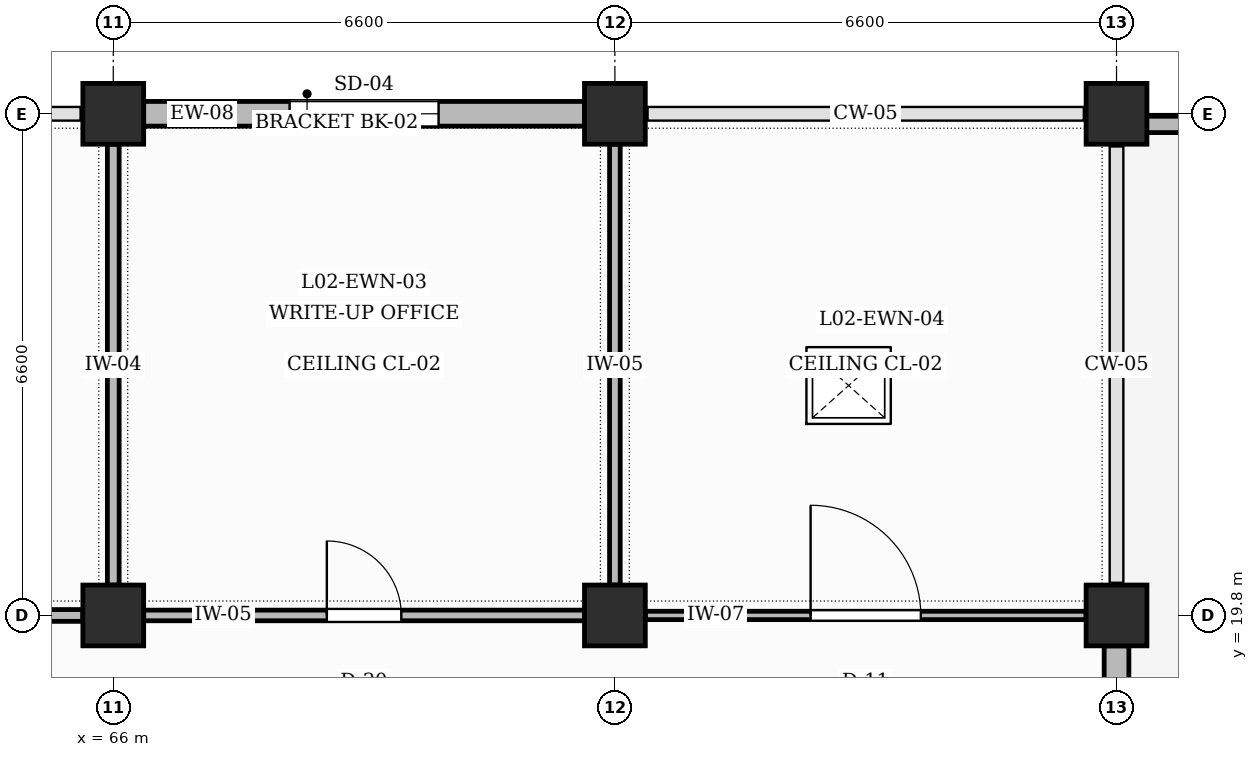
"""IFC4 building model, lengths in metres.
Left out: names, types, materials, properties, quantities, classifications, styles, units other than length and angle.
Written with IfcOpenShell. Run it as: python <this file> out.ifc"""

import sys

from ifc_helpers import new_model, si_unit, direction, frame, frame_2d, origin, origin_2d, place, context, subcontext, project, spatial, rectangle, extrude, element, fill, save


model = new_model("IFC4")
c1 = context("Model", 3, precision=1e-05, world=origin(), true_north=direction((0.0, 1.0)))
c2 = subcontext(c1, "Body", "Model", "MODEL_VIEW")
j1 = project(units=[si_unit("LENGTHUNIT", "METRE"), si_unit("PLANEANGLEUNIT", "RADIAN")], contexts=[c1])
p1 = place(None, origin())
s1 = spatial("IfcSite", under=j1, at=p1, CompositionType="ELEMENT")
p2 = place(p1, origin())
s2 = spatial("IfcBuilding", under=s1, at=p2, CompositionType="ELEMENT")
p3 = place(p2, frame((0.0, 0.0, 10.2)))
s3 = spatial("IfcBuildingStorey", under=s2, at=p3, CompositionType="ELEMENT", Elevation=10.2)
for number, where, z_axis, x_axis in (
    (1, (66.0, 19.8, 0.0), (0.0, 0.0, 1.0), (1.0, 0.0, 0.0)),
    (2, (66.0, 26.4, 0.0), (0.0, 0.0, 1.0), (1.0, 0.0, 0.0)),
    (3, (72.6, 19.8, 0.0), (0.0, 0.0, 1.0), (1.0, 0.0, 0.0)),
    (4, (72.6, 26.4, 0.0), (0.0, 0.0, 1.0), (1.0, 0.0, 0.0)),
    (5, (79.2, 19.8, 0.0), (0.0, 0.0, 1.0), (1.0, 0.0, 0.0)),
    (6, (79.2, 26.4, 0.0), (0.0, 0.0, 1.0), (1.0, 0.0, 0.0)),
):
    element("IfcColumn", number, at=place(p3, frame(where, z_axis=z_axis, x_axis=x_axis)), inside=s3, PredefinedType="COLUMN", context=c2, shape_type="SweptSolid", body=[
        extrude(rectangle(XDim=0.8, YDim=0.8, at=origin_2d()), origin(), (0.0, 0.0, 1.0), 4.2),
    ])
p4 = place(p3, frame((66.4, 26.4, 0.0), z_axis=(0.0, 0.0, 1.0), x_axis=(1.0, 0.0, 0.0)))
e7 = element("IfcWall", 7, at=p4, inside=s3, PredefinedType="SOLIDWALL", context=c2, shape_type="SweptSolid", body=[
    extrude(rectangle(XDim=5.8, YDim=0.325, at=frame_2d((2.9, 0.0))), origin(), (0.0, 0.0, 1.0), 3.25),
])
p5 = place(p4, frame((1.92, 0.0, 0.95)))
e8 = element("IfcOpeningElement", 8, at=p5, cuts=e7, PredefinedType="OPENING", context=c2, shape_type="SweptSolid", body=[
    extrude(rectangle(XDim=1.96, YDim=1.3, at=frame_2d((0.98, 0.65))), frame((0.0, 0.172, 0.0), z_axis=(0.0, -1.0, 0.0), x_axis=(1.0, 0.0, 0.0)), (0.0, 0.0, 1.0), 0.345),
])
p6 = place(p3, frame((79.2, 13.6, 0.0), z_axis=(0.0, 0.0, 1.0), x_axis=(0.0, 1.0, 0.0)))
e9 = element("IfcWall", 9, at=p6, inside=s3, PredefinedType="SOLIDWALL", context=c2, shape_type="SweptSolid", body=[
    extrude(rectangle(XDim=5.8, YDim=0.325, at=frame_2d((2.9, 0.0))), origin(), (0.0, 0.0, 1.0), 3.25),
])
p7 = place(p6, frame((1.92, 0.0, 0.95)))
e10 = element("IfcOpeningElement", 10, at=p7, cuts=e9, PredefinedType="OPENING", context=c2, shape_type="SweptSolid", body=[
    extrude(rectangle(XDim=1.96, YDim=1.74, at=frame_2d((0.98, 0.87))), frame((0.0, 0.172, 0.0), z_axis=(0.0, -1.0, 0.0), x_axis=(1.0, 0.0, 0.0)), (0.0, 0.0, 1.0), 0.345),
])
p8 = place(p3, frame((79.34, 26.26, 0.0), z_axis=(0.0, 0.0, 1.0), x_axis=(1.0, 0.0, 0.0)))
e11 = element("IfcWall", 11, at=p8, inside=s3, PredefinedType="PARAPET", context=c2, shape_type="SweptSolid", body=[
    extrude(rectangle(XDim=6.32, YDim=0.215, at=frame_2d((3.16, 0.0))), origin(), (0.0, 0.0, 1.0), 1.15),
])
p9 = place(p3, frame((59.8, 19.8, 0.0), z_axis=(0.0, 0.0, 1.0), x_axis=(1.0, 0.0, 0.0)))
e12 = element("IfcWall", 12, at=p9, inside=s3, PredefinedType="PARTITIONING", context=c2, shape_type="SweptSolid", body=[
    extrude(rectangle(XDim=5.8, YDim=0.155, at=frame_2d((2.9, 0.0))), origin(), (0.0, 0.0, 1.0), 3.0),
])
p10 = place(p9, frame((2.25, 0.0, 0.0)))
e13 = element("IfcOpeningElement", 13, at=p10, cuts=e12, PredefinedType="OPENING", context=c2, shape_type="SweptSolid", body=[
    extrude(rectangle(XDim=1.3, YDim=2.3, at=frame_2d((0.65, 1.15))), frame((0.0, 0.087, 0.0), z_axis=(0.0, -1.0, 0.0), x_axis=(1.0, 0.0, 0.0)), (0.0, 0.0, 1.0), 0.175),
])
p11 = place(p3, frame((66.0, 20.2, 0.0), z_axis=(0.0, 0.0, 1.0), x_axis=(0.0, 1.0, 0.0)))
e14 = element("IfcWall", 14, at=p11, inside=s3, PredefinedType="PARTITIONING", context=c2, shape_type="SweptSolid", body=[
    extrude(rectangle(XDim=5.8, YDim=0.155, at=frame_2d((2.9, 0.0))), origin(), (0.0, 0.0, 1.0), 3.1),
])
p12 = place(p3, frame((66.4, 19.8, 0.0), z_axis=(0.0, 0.0, 1.0), x_axis=(1.0, 0.0, 0.0)))
e15 = element("IfcWall", 15, at=p12, inside=s3, PredefinedType="PARTITIONING", context=c2, shape_type="SweptSolid", body=[
    extrude(rectangle(XDim=5.8, YDim=0.14, at=frame_2d((2.9, 0.0))), origin(), (0.0, 0.0, 1.0), 3.1),
])
p13 = place(p12, frame((2.41, 0.0, 0.0)))
e16 = element("IfcOpeningElement", 16, at=p13, cuts=e15, PredefinedType="OPENING", context=c2, shape_type="SweptSolid", body=[
    extrude(rectangle(XDim=0.98, YDim=2.15, at=frame_2d((0.49, 1.075))), frame((0.0, 0.08, 0.0), z_axis=(0.0, -1.0, 0.0), x_axis=(1.0, 0.0, 0.0)), (0.0, 0.0, 1.0), 0.16),
])
p14 = place(p3, frame((72.6, 20.2, 0.0), z_axis=(0.0, 0.0, 1.0), x_axis=(0.0, 1.0, 0.0)))
e17 = element("IfcWall", 17, at=p14, inside=s3, PredefinedType="PARTITIONING", context=c2, shape_type="SweptSolid", body=[
    extrude(rectangle(XDim=5.8, YDim=0.14, at=frame_2d((2.9, 0.0))), origin(), (0.0, 0.0, 1.0), 3.1),
])
p15 = place(p3, frame((73.0, 19.8, 0.0), z_axis=(0.0, 0.0, 1.0), x_axis=(1.0, 0.0, 0.0)))
e18 = element("IfcWall", 18, at=p15, inside=s3, PredefinedType="PARTITIONING", context=c2, shape_type="SweptSolid", body=[
    extrude(rectangle(XDim=5.8, YDim=0.11, at=frame_2d((2.9, 0.0))), origin(), (0.0, 0.0, 1.0), 3.0),
])
p16 = place(p15, frame((2.175, 0.0, 0.0)))
e19 = element("IfcOpeningElement", 19, at=p16, cuts=e18, PredefinedType="OPENING", context=c2, shape_type="SweptSolid", body=[
    extrude(rectangle(XDim=1.45, YDim=2.25, at=frame_2d((0.725, 1.125))), frame((0.0, 0.065, 0.0), z_axis=(0.0, -1.0, 0.0), x_axis=(1.0, 0.0, 0.0)), (0.0, 0.0, 1.0), 0.13),
])
p17 = place(p5, origin())
e20 = element("IfcWindow", 20, at=p17, inside=s3, PartitioningType="DOUBLE_PANEL_VERTICAL", PredefinedType="WINDOW", context=c2, shape_type="SweptSolid", body=[
    extrude(rectangle(XDim=1.96, YDim=1.3, at=frame_2d((0.98, 0.65))), frame((0.0, 0.03, 0.0), z_axis=(0.0, -1.0, 0.0), x_axis=(1.0, 0.0, 0.0)), (0.0, 0.0, 1.0), 0.06),
])
fill(e8, e20)
p18 = place(p13, origin())
e21 = element("IfcDoor", 21, at=p18, inside=s3, OperationType="SINGLE_SWING_LEFT", PredefinedType="DOOR", context=c2, shape_type="SweptSolid", body=[
    extrude(rectangle(XDim=0.98, YDim=2.15, at=frame_2d((0.49, 1.075))), frame((0.0, 0.025, 0.0), z_axis=(0.0, -1.0, 0.0), x_axis=(1.0, 0.0, 0.0)), (0.0, 0.0, 1.0), 0.05),
])
fill(e16, e21)
p19 = place(p16, origin())
e22 = element("IfcDoor", 22, at=p19, inside=s3, OperationType="SINGLE_SWING_LEFT", PredefinedType="DOOR", context=c2, shape_type="SweptSolid", body=[
    extrude(rectangle(XDim=1.45, YDim=2.25, at=frame_2d((0.725, 1.125))), frame((0.0, 0.025, 0.0), z_axis=(0.0, -1.0, 0.0), x_axis=(1.0, 0.0, 0.0)), (0.0, 0.0, 1.0), 0.05),
])
fill(e19, e22)
save(model, sys.argv[1])
